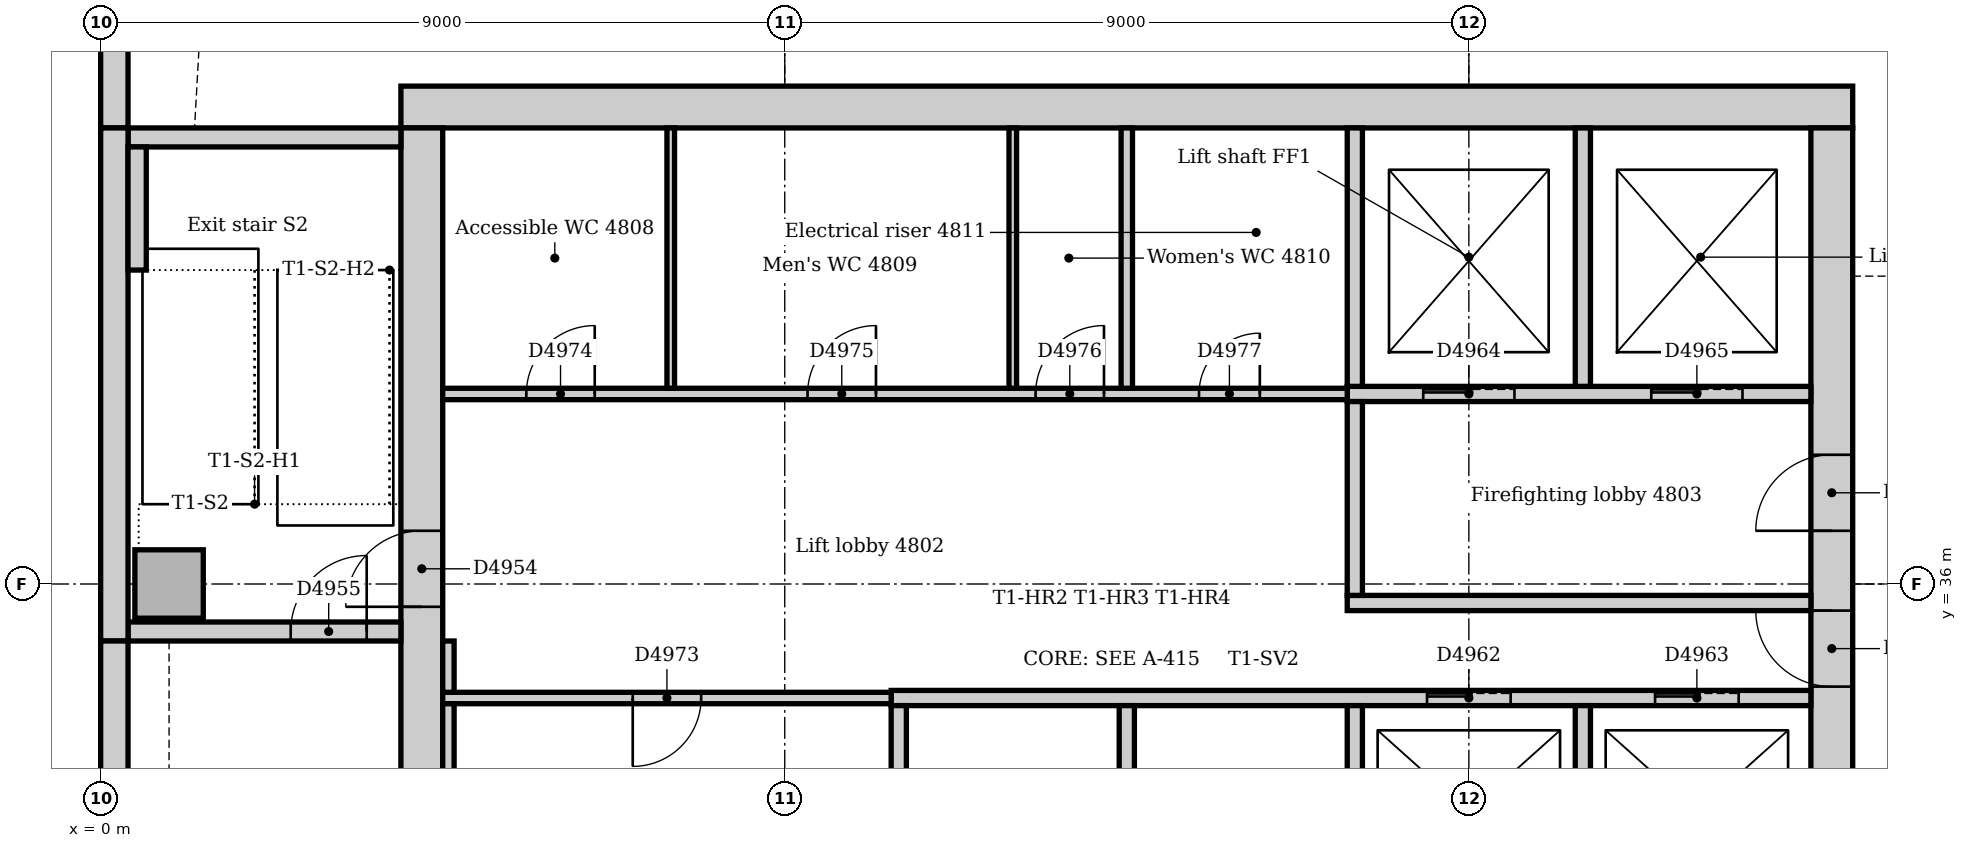
"""IFC4 building model, lengths in metres.
Left out: names, types, materials, properties, quantities, classifications, styles, units other than length and angle.
Written with IfcOpenShell. Run it as: python <this file> out.ifc"""

import sys

from ifc_helpers import new_model, si_unit, direction, frame, frame_2d, origin, origin_2d, place, context, subcontext, project, spatial, rectangle, extrude, element, fill, save


model = new_model("IFC4")
c1 = context("Model", 3, precision=1e-05, world=origin(), true_north=direction((0.0, 1.0)))
c2 = subcontext(c1, "Body", "Model", "MODEL_VIEW")
j1 = project(units=[si_unit("LENGTHUNIT", "METRE"), si_unit("PLANEANGLEUNIT", "RADIAN")], contexts=[c1])
p1 = place(None, origin())
s1 = spatial("IfcSite", under=j1, at=p1, CompositionType="ELEMENT")
p2 = place(p1, origin())
s2 = spatial("IfcBuilding", under=s1, at=p2, CompositionType="ELEMENT")
p3 = place(p2, frame((0.0, 0.0, 202.0)))
s3 = spatial("IfcBuildingStorey", under=s2, at=p3, CompositionType="ELEMENT", Elevation=202.0)
p4 = place(p3, frame((23.05, 42.275, 0.0), z_axis=(0.0, 0.0, 1.0), x_axis=(-1.0, 0.0, 0.0)))
e1 = element("IfcWall", 1, at=p4, inside=s3, PredefinedType="SOLIDWALL", context=c2, shape_type="SweptSolid", body=[
    extrude(rectangle(XDim=19.1, YDim=0.55, at=frame_2d((9.55, 0.0))), origin(), (0.0, 0.0, 1.0), 4.0),
])
p5 = place(p3, frame((22.775, 31.5, 0.0), z_axis=(0.0, 0.0, 1.0), x_axis=(0.0, 1.0, 0.0)))
e2 = element("IfcWall", 2, at=p5, inside=s3, PredefinedType="SOLIDWALL", context=c2, shape_type="SweptSolid", body=[
    extrude(rectangle(XDim=10.5, YDim=0.55, at=frame_2d((5.25, 0.0))), origin(), (0.0, 0.0, 1.0), 4.0),
])
p6 = place(p5, frame((3.15, 0.0, 0.0)))
e3 = element("IfcOpeningElement", 3, at=p6, cuts=e2, PredefinedType="OPENING", context=c2, shape_type="SweptSolid", body=[
    extrude(rectangle(XDim=1.0, YDim=2.1, at=frame_2d((0.5, 1.05))), frame((0.0, 0.285, 0.0), z_axis=(0.0, -1.0, 0.0), x_axis=(1.0, 0.0, 0.0)), (0.0, 0.0, 1.0), 0.57),
])
p7 = place(p5, frame((5.2, 0.0, 0.0)))
e4 = element("IfcOpeningElement", 4, at=p7, cuts=e2, PredefinedType="OPENING", context=c2, shape_type="SweptSolid", body=[
    extrude(rectangle(XDim=1.0, YDim=2.1, at=frame_2d((0.5, 1.05))), frame((0.0, 0.285, 0.0), z_axis=(0.0, -1.0, 0.0), x_axis=(1.0, 0.0, 0.0)), (0.0, 0.0, 1.0), 0.57),
])
p8 = place(p3, frame((4.225, 42.0, 0.0), z_axis=(0.0, 0.0, 1.0), x_axis=(0.0, -1.0, 0.0)))
e5 = element("IfcWall", 5, at=p8, inside=s3, PredefinedType="SOLIDWALL", context=c2, shape_type="SweptSolid", body=[
    extrude(rectangle(XDim=10.5, YDim=0.55, at=frame_2d((5.25, 0.0))), origin(), (0.0, 0.0, 1.0), 4.0),
])
p9 = place(p8, frame((5.3, 0.0, 0.0)))
e6 = element("IfcOpeningElement", 6, at=p9, cuts=e5, PredefinedType="OPENING", context=c2, shape_type="SweptSolid", body=[
    extrude(rectangle(XDim=1.0, YDim=2.1, at=frame_2d((0.5, 1.05))), frame((0.0, 0.285, 0.0), z_axis=(0.0, -1.0, 0.0), x_axis=(1.0, 0.0, 0.0)), (0.0, 0.0, 1.0), 0.57),
])
p10 = place(p3, frame((0.36, 35.375, 0.0), z_axis=(0.0, 0.0, 1.0), x_axis=(1.0, 0.0, 0.0)))
e7 = element("IfcWall", 7, at=p10, inside=s3, PredefinedType="SOLIDWALL", context=c2, shape_type="SweptSolid", body=[
    extrude(rectangle(XDim=3.59, YDim=0.25, at=frame_2d((1.795, 0.0))), origin(), (0.0, 0.0, 1.0), 4.0),
])
p11 = place(p10, frame((2.14, 0.0, 0.0)))
e8 = element("IfcOpeningElement", 8, at=p11, cuts=e7, PredefinedType="OPENING", context=c2, shape_type="SweptSolid", body=[
    extrude(rectangle(XDim=1.0, YDim=2.1, at=frame_2d((0.5, 1.05))), frame((0.0, 0.135, 0.0), z_axis=(0.0, -1.0, 0.0), x_axis=(1.0, 0.0, 0.0)), (0.0, 0.0, 1.0), 0.27),
])
p12 = place(p3, frame((3.95, 41.875, 0.0), z_axis=(0.0, 0.0, 1.0), x_axis=(-1.0, 0.0, 0.0)))
e9 = element("IfcWall", 9, at=p12, inside=s3, PredefinedType="SOLIDWALL", context=c2, shape_type="SweptSolid", body=[
    extrude(rectangle(XDim=3.59, YDim=0.25, at=frame_2d((1.795, 0.0))), origin(), (0.0, 0.0, 1.0), 4.0),
])
p13 = place(p3, frame((0.9, 36.0, 0.0), z_axis=(0.0, 0.0, 1.0), x_axis=(1.0, 0.0, 0.0)))
e10 = element("IfcColumn", 10, at=p13, inside=s3, PredefinedType="COLUMN", context=c2, shape_type="SweptSolid", body=[
    extrude(rectangle(XDim=0.9, YDim=0.9, at=origin_2d()), origin(), (0.0, 0.0, 1.0), 4.0),
])
p14 = place(p3, frame((0.18, 54.257, 0.0), z_axis=(0.0, 0.0, 1.0), x_axis=(0.0, -1.0, 0.0)))
e11 = element("IfcWall", 11, at=p14, inside=s3, PredefinedType="STANDARD", context=c2, shape_type="SweptSolid", body=[
    extrude(rectangle(XDim=12.257, YDim=0.36, at=frame_2d((6.129, 0.0))), origin(), (0.0, 0.0, 1.0), 3.85),
])
p15 = place(p14, frame((3.107, 0.0, 0.9)))
e12 = element("IfcOpeningElement", 12, at=p15, cuts=e11, PredefinedType="OPENING", context=c2, shape_type="SweptSolid", body=[
    extrude(rectangle(XDim=3.3, YDim=1.6, at=frame_2d((1.65, 0.8))), frame((0.0, 0.19, 0.0), z_axis=(0.0, -1.0, 0.0), x_axis=(1.0, 0.0, 0.0)), (0.0, 0.0, 1.0), 0.38),
])
p16 = place(p14, frame((7.607, 0.0, 0.9)))
e13 = element("IfcOpeningElement", 13, at=p16, cuts=e11, PredefinedType="OPENING", context=c2, shape_type="SweptSolid", body=[
    extrude(rectangle(XDim=3.3, YDim=1.6, at=frame_2d((1.65, 0.8))), frame((0.0, 0.19, 0.0), z_axis=(0.0, -1.0, 0.0), x_axis=(1.0, 0.0, 0.0)), (0.0, 0.0, 1.0), 0.38),
])
p17 = place(p3, frame((0.18, 42.0, 0.0), z_axis=(0.0, 0.0, 1.0), x_axis=(0.0, -1.0, 0.0)))
e14 = element("IfcWall", 14, at=p17, inside=s3, PredefinedType="STANDARD", context=c2, shape_type="SweptSolid", body=[
    extrude(rectangle(XDim=6.75, YDim=0.36, at=frame_2d((3.375, 0.0))), origin(), (0.0, 0.0, 1.0), 3.85),
])
p18 = place(p3, frame((0.18, 35.25, 0.0), z_axis=(0.0, 0.0, 1.0), x_axis=(0.0, -1.0, 0.0)))
e15 = element("IfcWall", 15, at=p18, inside=s3, PredefinedType="STANDARD", context=c2, shape_type="SweptSolid", body=[
    extrude(rectangle(XDim=7.5, YDim=0.36, at=frame_2d((3.75, 0.0))), origin(), (0.0, 0.0, 1.0), 3.85),
])
p19 = place(p3, frame((0.48, 40.13, 0.0), z_axis=(0.0, 0.0, 1.0), x_axis=(0.0, 1.0, 0.0)))
e16 = element("IfcWall", 16, at=p19, inside=s3, PredefinedType="STANDARD", context=c2, shape_type="SweptSolid", body=[
    extrude(rectangle(XDim=1.62, YDim=0.24, at=frame_2d((0.81, 0.0))), origin(), (0.0, 0.0, 1.0), 4.0),
])
p20 = place(p3, frame((16.4, 35.75, 0.0), z_axis=(0.0, 0.0, 1.0), x_axis=(1.0, 0.0, 0.0)))
e17 = element("IfcWall", 17, at=p20, inside=s3, PredefinedType="PARTITIONING", context=c2, shape_type="SweptSolid", body=[
    extrude(rectangle(XDim=6.1, YDim=0.2, at=frame_2d((3.05, 0.0))), origin(), (0.0, 0.0, 1.0), 3.85),
])
p21 = place(p3, frame((16.4, 38.5, 0.0), z_axis=(0.0, 0.0, 1.0), x_axis=(1.0, 0.0, 0.0)))
e18 = element("IfcWall", 18, at=p21, inside=s3, PredefinedType="PARTITIONING", context=c2, shape_type="SweptSolid", body=[
    extrude(rectangle(XDim=6.1, YDim=0.2, at=frame_2d((3.05, 0.0))), origin(), (0.0, 0.0, 1.0), 3.85),
])
p22 = place(p21, frame((1.0, 0.0, 0.0)))
e19 = element("IfcOpeningElement", 19, at=p22, cuts=e18, PredefinedType="OPENING", context=c2, shape_type="SweptSolid", body=[
    extrude(rectangle(XDim=1.2, YDim=2.1, at=frame_2d((0.6, 1.05))), frame((0.0, 0.11, 0.0), z_axis=(0.0, -1.0, 0.0), x_axis=(1.0, 0.0, 0.0)), (0.0, 0.0, 1.0), 0.22),
])
p23 = place(p21, frame((4.0, 0.0, 0.0)))
e20 = element("IfcOpeningElement", 20, at=p23, cuts=e18, PredefinedType="OPENING", context=c2, shape_type="SweptSolid", body=[
    extrude(rectangle(XDim=1.2, YDim=2.1, at=frame_2d((0.6, 1.05))), frame((0.0, 0.11, 0.0), z_axis=(0.0, -1.0, 0.0), x_axis=(1.0, 0.0, 0.0)), (0.0, 0.0, 1.0), 0.22),
])
p24 = place(p3, frame((16.5, 35.85, 0.0), z_axis=(0.0, 0.0, 1.0), x_axis=(0.0, 1.0, 0.0)))
e21 = element("IfcWall", 21, at=p24, inside=s3, PredefinedType="PARTITIONING", context=c2, shape_type="SweptSolid", body=[
    extrude(rectangle(XDim=2.55, YDim=0.2, at=frame_2d((1.275, 0.0))), origin(), (0.0, 0.0, 1.0), 3.85),
])
p25 = place(p3, frame((10.4, 34.5, 0.0), z_axis=(0.0, 0.0, 1.0), x_axis=(1.0, 0.0, 0.0)))
e22 = element("IfcWall", 22, at=p25, inside=s3, PredefinedType="PARTITIONING", context=c2, shape_type="SweptSolid", body=[
    extrude(rectangle(XDim=12.1, YDim=0.2, at=frame_2d((6.05, 0.0))), origin(), (0.0, 0.0, 1.0), 3.85),
])
p26 = place(p25, frame((7.05, 0.0, 0.0)))
e23 = element("IfcOpeningElement", 23, at=p26, cuts=e22, PredefinedType="OPENING", context=c2, shape_type="SweptSolid", body=[
    extrude(rectangle(XDim=1.1, YDim=2.1, at=frame_2d((0.55, 1.05))), frame((0.0, 0.11, 0.0), z_axis=(0.0, -1.0, 0.0), x_axis=(1.0, 0.0, 0.0)), (0.0, 0.0, 1.0), 0.22),
])
p27 = place(p25, frame((10.05, 0.0, 0.0)))
e24 = element("IfcOpeningElement", 24, at=p27, cuts=e22, PredefinedType="OPENING", context=c2, shape_type="SweptSolid", body=[
    extrude(rectangle(XDim=1.1, YDim=2.1, at=frame_2d((0.55, 1.05))), frame((0.0, 0.11, 0.0), z_axis=(0.0, -1.0, 0.0), x_axis=(1.0, 0.0, 0.0)), (0.0, 0.0, 1.0), 0.22),
])
for number, where, z_axis, x_axis in (
    (25, (10.5, 31.75, 0.0), (0.0, 0.0, 1.0), (0.0, 1.0, 0.0)),
    (26, (13.5, 31.75, 0.0), (0.0, 0.0, 1.0), (0.0, 1.0, 0.0)),
    (27, (16.5, 31.75, 0.0), (0.0, 0.0, 1.0), (0.0, 1.0, 0.0)),
    (28, (19.5, 31.75, 0.0), (0.0, 0.0, 1.0), (0.0, 1.0, 0.0)),
):
    element("IfcWall", number, at=place(p3, frame(where, z_axis=z_axis, x_axis=x_axis)), inside=s3, PredefinedType="PARTITIONING", context=c2, shape_type="SweptSolid", body=[
        extrude(rectangle(XDim=2.65, YDim=0.2, at=frame_2d((1.325, 0.0))), origin(), (0.0, 0.0, 1.0), 3.85),
    ])
for number, where, z_axis, x_axis in (
    (29, (16.5, 38.6, 0.0), (0.0, 0.0, 1.0), (0.0, 1.0, 0.0)),
    (30, (19.5, 38.6, 0.0), (0.0, 0.0, 1.0), (0.0, 1.0, 0.0)),
):
    element("IfcWall", number, at=place(p3, frame(where, z_axis=z_axis, x_axis=x_axis)), inside=s3, PredefinedType="PARTITIONING", context=c2, shape_type="SweptSolid", body=[
        extrude(rectangle(XDim=3.4, YDim=0.2, at=frame_2d((1.7, 0.0))), origin(), (0.0, 0.0, 1.0), 3.85),
    ])
p28 = place(p3, frame((4.5, 38.5, 0.0), z_axis=(0.0, 0.0, 1.0), x_axis=(1.0, 0.0, 0.0)))
e31 = element("IfcWall", 31, at=p28, inside=s3, PredefinedType="PARTITIONING", context=c2, shape_type="SweptSolid", body=[
    extrude(rectangle(XDim=11.9, YDim=0.15, at=frame_2d((5.95, 0.0))), origin(), (0.0, 0.0, 1.0), 3.85),
])
p29 = place(p28, frame((1.1, 0.0, 0.0)))
e32 = element("IfcOpeningElement", 32, at=p29, cuts=e31, PredefinedType="OPENING", context=c2, shape_type="SweptSolid", body=[
    extrude(rectangle(XDim=0.9, YDim=2.1, at=frame_2d((0.45, 1.05))), frame((0.0, 0.085, 0.0), z_axis=(0.0, -1.0, 0.0), x_axis=(1.0, 0.0, 0.0)), (0.0, 0.0, 1.0), 0.17),
])
p30 = place(p28, frame((4.8, 0.0, 0.0)))
e33 = element("IfcOpeningElement", 33, at=p30, cuts=e31, PredefinedType="OPENING", context=c2, shape_type="SweptSolid", body=[
    extrude(rectangle(XDim=0.9, YDim=2.1, at=frame_2d((0.45, 1.05))), frame((0.0, 0.085, 0.0), z_axis=(0.0, -1.0, 0.0), x_axis=(1.0, 0.0, 0.0)), (0.0, 0.0, 1.0), 0.17),
])
p31 = place(p28, frame((7.8, 0.0, 0.0)))
e34 = element("IfcOpeningElement", 34, at=p31, cuts=e31, PredefinedType="OPENING", context=c2, shape_type="SweptSolid", body=[
    extrude(rectangle(XDim=0.9, YDim=2.1, at=frame_2d((0.45, 1.05))), frame((0.0, 0.085, 0.0), z_axis=(0.0, -1.0, 0.0), x_axis=(1.0, 0.0, 0.0)), (0.0, 0.0, 1.0), 0.17),
])
p32 = place(p28, frame((9.95, 0.0, 0.0)))
e35 = element("IfcOpeningElement", 35, at=p32, cuts=e31, PredefinedType="OPENING", context=c2, shape_type="SweptSolid", body=[
    extrude(rectangle(XDim=0.8, YDim=2.1, at=frame_2d((0.4, 1.05))), frame((0.0, 0.085, 0.0), z_axis=(0.0, -1.0, 0.0), x_axis=(1.0, 0.0, 0.0)), (0.0, 0.0, 1.0), 0.17),
])
p33 = place(p3, frame((4.5, 34.5, 0.0), z_axis=(0.0, 0.0, 1.0), x_axis=(1.0, 0.0, 0.0)))
e36 = element("IfcWall", 36, at=p33, inside=s3, PredefinedType="PARTITIONING", context=c2, shape_type="SweptSolid", body=[
    extrude(rectangle(XDim=5.9, YDim=0.15, at=frame_2d((2.95, 0.0))), origin(), (0.0, 0.0, 1.0), 3.85),
])
p34 = place(p33, frame((2.5, 0.0, 0.0)))
e37 = element("IfcOpeningElement", 37, at=p34, cuts=e36, PredefinedType="OPENING", context=c2, shape_type="SweptSolid", body=[
    extrude(rectangle(XDim=0.9, YDim=2.1, at=frame_2d((0.45, 1.05))), frame((0.0, 0.085, 0.0), z_axis=(0.0, -1.0, 0.0), x_axis=(1.0, 0.0, 0.0)), (0.0, 0.0, 1.0), 0.17),
])
p35 = place(p3, frame((4.575, 34.575, 0.0), z_axis=(0.0, 0.0, 1.0), x_axis=(0.0, 1.0, 0.0)))
e38 = element("IfcWall", 38, at=p35, inside=s3, PredefinedType="PARTITIONING", context=c2, shape_type="SweptSolid", body=[
    extrude(rectangle(XDim=0.675, YDim=0.15, at=frame_2d((0.338, 0.0))), origin(), (0.0, 0.0, 1.0), 3.85),
])
p36 = place(p3, frame((4.575, 31.75, 0.0), z_axis=(0.0, 0.0, 1.0), x_axis=(0.0, 1.0, 0.0)))
e39 = element("IfcWall", 39, at=p36, inside=s3, PredefinedType="PARTITIONING", context=c2, shape_type="SweptSolid", body=[
    extrude(rectangle(XDim=2.675, YDim=0.15, at=frame_2d((1.337, 0.0))), origin(), (0.0, 0.0, 1.0), 3.85),
])
p37 = place(p3, frame((13.5, 38.575, 0.0), z_axis=(0.0, 0.0, 1.0), x_axis=(0.0, 1.0, 0.0)))
e40 = element("IfcWall", 40, at=p37, inside=s3, PredefinedType="PARTITIONING", context=c2, shape_type="SweptSolid", body=[
    extrude(rectangle(XDim=3.425, YDim=0.15, at=frame_2d((1.712, 0.0))), origin(), (0.0, 0.0, 1.0), 3.85),
])
for number, where, z_axis, x_axis in (
    (41, (7.5, 38.575, 0.0), (0.0, 0.0, 1.0), (0.0, 1.0, 0.0)),
    (42, (12.0, 38.575, 0.0), (0.0, 0.0, 1.0), (0.0, 1.0, 0.0)),
):
    element("IfcWall", number, at=place(p3, frame(where, z_axis=z_axis, x_axis=x_axis)), inside=s3, PredefinedType="PARTITIONING", context=c2, shape_type="SweptSolid", body=[
        extrude(rectangle(XDim=3.425, YDim=0.1, at=frame_2d((1.712, 0.0))), origin(), (0.0, 0.0, 1.0), 3.85),
    ])
p38 = place(p9, frame((1.0, 0.0, 0.0), z_axis=(0.0, 0.0, 1.0), x_axis=(-1.0, 0.0, 0.0)))
e43 = element("IfcDoor", 43, at=p38, inside=s3, OperationType="SINGLE_SWING_LEFT", PredefinedType="DOOR", context=c2, shape_type="SweptSolid", body=[
    extrude(rectangle(XDim=1.0, YDim=2.1, at=frame_2d((0.5, 1.05))), frame((0.0, 0.025, 0.0), z_axis=(0.0, -1.0, 0.0), x_axis=(1.0, 0.0, 0.0)), (0.0, 0.0, 1.0), 0.05),
])
fill(e6, e43)
p39 = place(p11, origin())
e44 = element("IfcDoor", 44, at=p39, inside=s3, OperationType="SINGLE_SWING_RIGHT", PredefinedType="DOOR", context=c2, shape_type="SweptSolid", body=[
    extrude(rectangle(XDim=1.0, YDim=2.1, at=frame_2d((0.5, 1.05))), frame((0.0, 0.025, 0.0), z_axis=(0.0, -1.0, 0.0), x_axis=(1.0, 0.0, 0.0)), (0.0, 0.0, 1.0), 0.05),
])
fill(e8, e44)
p40 = place(p26, origin())
e45 = element("IfcDoor", 45, at=p40, inside=s3, OperationType="SLIDING_TO_LEFT", PredefinedType="DOOR", context=c2, shape_type="SweptSolid", body=[
    extrude(rectangle(XDim=1.1, YDim=2.1, at=frame_2d((0.55, 1.05))), frame((0.0, 0.025, 0.0), z_axis=(0.0, -1.0, 0.0), x_axis=(1.0, 0.0, 0.0)), (0.0, 0.0, 1.0), 0.05),
])
fill(e23, e45)
p41 = place(p27, origin())
e46 = element("IfcDoor", 46, at=p41, inside=s3, OperationType="SLIDING_TO_LEFT", PredefinedType="DOOR", context=c2, shape_type="SweptSolid", body=[
    extrude(rectangle(XDim=1.1, YDim=2.1, at=frame_2d((0.55, 1.05))), frame((0.0, 0.025, 0.0), z_axis=(0.0, -1.0, 0.0), x_axis=(1.0, 0.0, 0.0)), (0.0, 0.0, 1.0), 0.05),
])
fill(e24, e46)
p42 = place(p22, origin())
e47 = element("IfcDoor", 47, at=p42, inside=s3, OperationType="SLIDING_TO_LEFT", PredefinedType="DOOR", context=c2, shape_type="SweptSolid", body=[
    extrude(rectangle(XDim=1.2, YDim=2.1, at=frame_2d((0.6, 1.05))), frame((0.0, 0.025, 0.0), z_axis=(0.0, -1.0, 0.0), x_axis=(1.0, 0.0, 0.0)), (0.0, 0.0, 1.0), 0.05),
])
fill(e19, e47)
p43 = place(p23, origin())
e48 = element("IfcDoor", 48, at=p43, inside=s3, OperationType="SLIDING_TO_LEFT", PredefinedType="DOOR", context=c2, shape_type="SweptSolid", body=[
    extrude(rectangle(XDim=1.2, YDim=2.1, at=frame_2d((0.6, 1.05))), frame((0.0, 0.025, 0.0), z_axis=(0.0, -1.0, 0.0), x_axis=(1.0, 0.0, 0.0)), (0.0, 0.0, 1.0), 0.05),
])
fill(e20, e48)
p44 = place(p6, origin())
e49 = element("IfcDoor", 49, at=p44, inside=s3, OperationType="SINGLE_SWING_RIGHT", PredefinedType="DOOR", context=c2, shape_type="SweptSolid", body=[
    extrude(rectangle(XDim=1.0, YDim=2.1, at=frame_2d((0.5, 1.05))), frame((0.0, 0.025, 0.0), z_axis=(0.0, -1.0, 0.0), x_axis=(1.0, 0.0, 0.0)), (0.0, 0.0, 1.0), 0.05),
])
fill(e3, e49)
p45 = place(p7, origin())
e50 = element("IfcDoor", 50, at=p45, inside=s3, OperationType="SINGLE_SWING_LEFT", PredefinedType="DOOR", context=c2, shape_type="SweptSolid", body=[
    extrude(rectangle(XDim=1.0, YDim=2.1, at=frame_2d((0.5, 1.05))), frame((0.0, 0.025, 0.0), z_axis=(0.0, -1.0, 0.0), x_axis=(1.0, 0.0, 0.0)), (0.0, 0.0, 1.0), 0.05),
])
fill(e4, e50)
p46 = place(p34, frame((0.9, 0.0, 0.0), z_axis=(0.0, 0.0, 1.0), x_axis=(-1.0, 0.0, 0.0)))
e51 = element("IfcDoor", 51, at=p46, inside=s3, OperationType="SINGLE_SWING_RIGHT", PredefinedType="DOOR", context=c2, shape_type="SweptSolid", body=[
    extrude(rectangle(XDim=0.9, YDim=2.1, at=frame_2d((0.45, 1.05))), frame((0.0, 0.025, 0.0), z_axis=(0.0, -1.0, 0.0), x_axis=(1.0, 0.0, 0.0)), (0.0, 0.0, 1.0), 0.05),
])
fill(e37, e51)
p47 = place(p29, origin())
e52 = element("IfcDoor", 52, at=p47, inside=s3, OperationType="SINGLE_SWING_RIGHT", PredefinedType="DOOR", context=c2, shape_type="SweptSolid", body=[
    extrude(rectangle(XDim=0.9, YDim=2.1, at=frame_2d((0.45, 1.05))), frame((0.0, 0.025, 0.0), z_axis=(0.0, -1.0, 0.0), x_axis=(1.0, 0.0, 0.0)), (0.0, 0.0, 1.0), 0.05),
])
fill(e32, e52)
p48 = place(p30, origin())
e53 = element("IfcDoor", 53, at=p48, inside=s3, OperationType="SINGLE_SWING_RIGHT", PredefinedType="DOOR", context=c2, shape_type="SweptSolid", body=[
    extrude(rectangle(XDim=0.9, YDim=2.1, at=frame_2d((0.45, 1.05))), frame((0.0, 0.025, 0.0), z_axis=(0.0, -1.0, 0.0), x_axis=(1.0, 0.0, 0.0)), (0.0, 0.0, 1.0), 0.05),
])
fill(e33, e53)
p49 = place(p31, origin())
e54 = element("IfcDoor", 54, at=p49, inside=s3, OperationType="SINGLE_SWING_RIGHT", PredefinedType="DOOR", context=c2, shape_type="SweptSolid", body=[
    extrude(rectangle(XDim=0.9, YDim=2.1, at=frame_2d((0.45, 1.05))), frame((0.0, 0.025, 0.0), z_axis=(0.0, -1.0, 0.0), x_axis=(1.0, 0.0, 0.0)), (0.0, 0.0, 1.0), 0.05),
])
fill(e34, e54)
p50 = place(p32, origin())
e55 = element("IfcDoor", 55, at=p50, inside=s3, OperationType="SINGLE_SWING_RIGHT", PredefinedType="DOOR", context=c2, shape_type="SweptSolid", body=[
    extrude(rectangle(XDim=0.8, YDim=2.1, at=frame_2d((0.4, 1.05))), frame((0.0, 0.025, 0.0), z_axis=(0.0, -1.0, 0.0), x_axis=(1.0, 0.0, 0.0)), (0.0, 0.0, 1.0), 0.05),
])
fill(e35, e55)
save(model, sys.argv[1])
